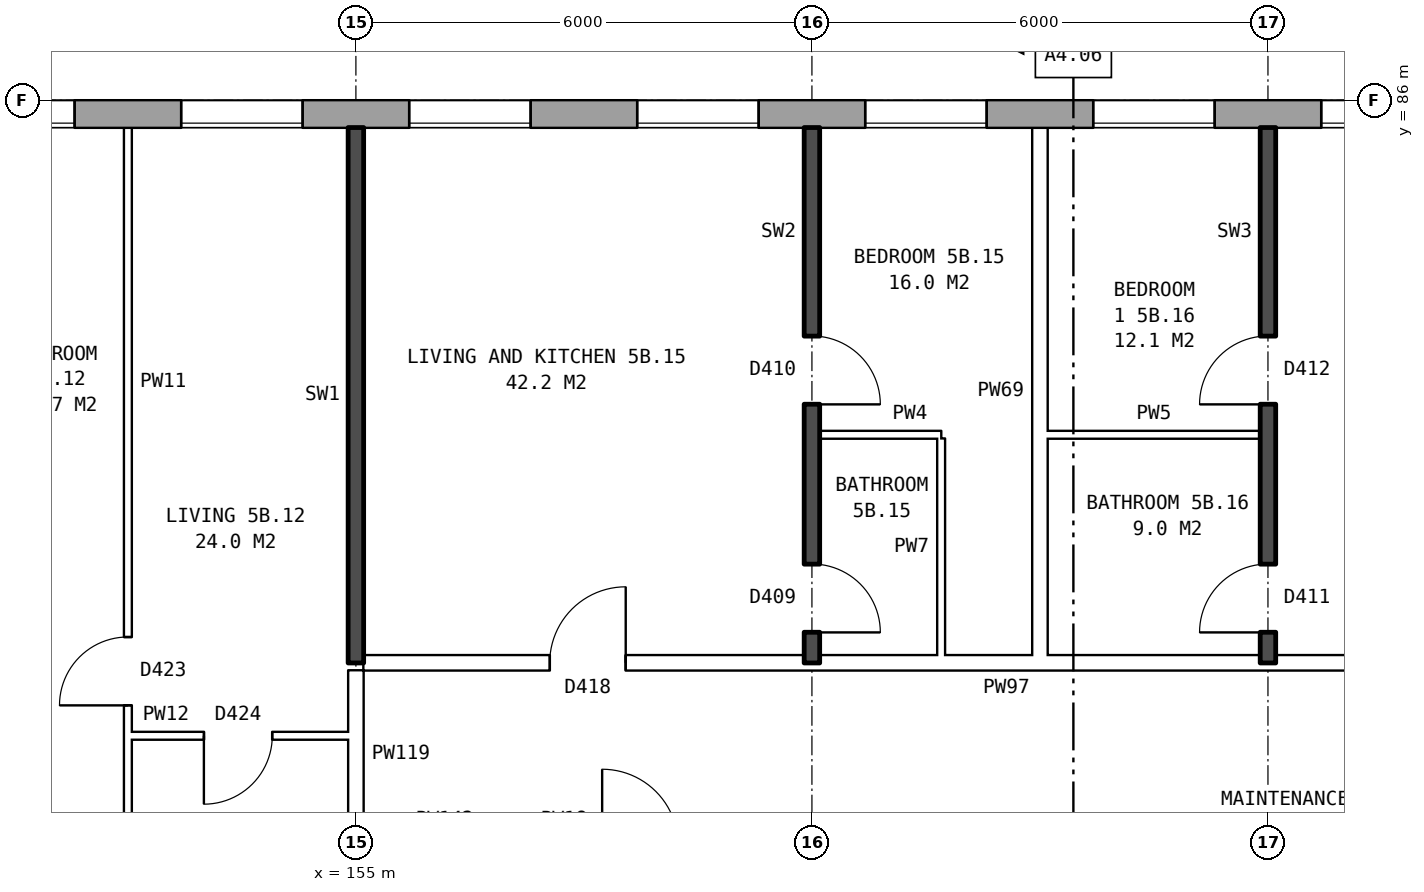
"""IFC4 building model, lengths in metres.
Left out: names, types, materials, properties, quantities, classifications, styles, units other than length and angle.
Written with IfcOpenShell. Run it as: python <this file> out.ifc"""

import sys

from ifc_helpers import new_model, si_unit, direction, frame, frame_2d, origin, place, context, subcontext, project, spatial, rectangle, extrude, element, fill, save


model = new_model("IFC4")
c1 = context("Model", 3, precision=1e-05, world=origin(), true_north=direction((0.0, 1.0)))
c2 = subcontext(c1, "Body", "Model", "MODEL_VIEW")
j1 = project(units=[si_unit("LENGTHUNIT", "METRE"), si_unit("PLANEANGLEUNIT", "RADIAN")], contexts=[c1])
p1 = place(None, origin())
s1 = spatial("IfcSite", under=j1, at=p1, CompositionType="ELEMENT")
p2 = place(p1, origin())
s2 = spatial("IfcBuilding", under=s1, at=p2, CompositionType="ELEMENT")
p3 = place(p2, frame((0.0, 0.0, 22.6)))
s3 = spatial("IfcBuildingStorey", under=s2, at=p3, CompositionType="ELEMENT", Elevation=22.6)
p4 = place(p3, frame((174.675, 85.82, 0.0), z_axis=(0.0, 0.0, 1.0), x_axis=(-1.0, 0.0, 0.0)))
e1 = element("IfcWall", 1, at=p4, inside=s3, PredefinedType="STANDARD", context=c2, shape_type="SweptSolid", body=[
    extrude(rectangle(XDim=40.601, YDim=0.36, at=frame_2d((20.3, 0.0))), origin(), (0.0, 0.0, 1.0), 2.85),
])
p5 = place(p4, frame((1.875, 0.0, 1.7)))
e2 = element("IfcOpeningElement", 2, at=p5, cuts=e1, PredefinedType="OPENING", context=c2, shape_type="SweptSolid", body=[
    extrude(rectangle(XDim=1.0, YDim=0.9, at=frame_2d((0.5, 0.45))), frame((0.0, 0.19, 0.0), z_axis=(0.0, -1.0, 0.0), x_axis=(1.0, 0.0, 0.0)), (0.0, 0.0, 1.0), 0.38),
])
p6 = place(p4, frame((5.375, 0.0, 0.8)))
e3 = element("IfcOpeningElement", 3, at=p6, cuts=e1, PredefinedType="OPENING", context=c2, shape_type="SweptSolid", body=[
    extrude(rectangle(XDim=1.6, YDim=1.8, at=frame_2d((0.8, 0.9))), frame((0.0, 0.19, 0.0), z_axis=(0.0, -1.0, 0.0), x_axis=(1.0, 0.0, 0.0)), (0.0, 0.0, 1.0), 0.38),
])
p7 = place(p4, frame((8.375, 0.0, 0.8)))
e4 = element("IfcOpeningElement", 4, at=p7, cuts=e1, PredefinedType="OPENING", context=c2, shape_type="SweptSolid", body=[
    extrude(rectangle(XDim=1.6, YDim=1.8, at=frame_2d((0.8, 0.9))), frame((0.0, 0.19, 0.0), z_axis=(0.0, -1.0, 0.0), x_axis=(1.0, 0.0, 0.0)), (0.0, 0.0, 1.0), 0.38),
])
p8 = place(p4, frame((11.375, 0.0, 0.8)))
e5 = element("IfcOpeningElement", 5, at=p8, cuts=e1, PredefinedType="OPENING", context=c2, shape_type="SweptSolid", body=[
    extrude(rectangle(XDim=1.6, YDim=1.8, at=frame_2d((0.8, 0.9))), frame((0.0, 0.19, 0.0), z_axis=(0.0, -1.0, 0.0), x_axis=(1.0, 0.0, 0.0)), (0.0, 0.0, 1.0), 0.38),
])
p9 = place(p4, frame((14.375, 0.0, 0.8)))
e6 = element("IfcOpeningElement", 6, at=p9, cuts=e1, PredefinedType="OPENING", context=c2, shape_type="SweptSolid", body=[
    extrude(rectangle(XDim=1.6, YDim=1.8, at=frame_2d((0.8, 0.9))), frame((0.0, 0.19, 0.0), z_axis=(0.0, -1.0, 0.0), x_axis=(1.0, 0.0, 0.0)), (0.0, 0.0, 1.0), 0.38),
])
p10 = place(p4, frame((17.375, 0.0, 0.8)))
e7 = element("IfcOpeningElement", 7, at=p10, cuts=e1, PredefinedType="OPENING", context=c2, shape_type="SweptSolid", body=[
    extrude(rectangle(XDim=1.6, YDim=1.8, at=frame_2d((0.8, 0.9))), frame((0.0, 0.19, 0.0), z_axis=(0.0, -1.0, 0.0), x_axis=(1.0, 0.0, 0.0)), (0.0, 0.0, 1.0), 0.38),
])
p11 = place(p4, frame((20.375, 0.0, 0.8)))
e8 = element("IfcOpeningElement", 8, at=p11, cuts=e1, PredefinedType="OPENING", context=c2, shape_type="SweptSolid", body=[
    extrude(rectangle(XDim=1.6, YDim=1.8, at=frame_2d((0.8, 0.9))), frame((0.0, 0.19, 0.0), z_axis=(0.0, -1.0, 0.0), x_axis=(1.0, 0.0, 0.0)), (0.0, 0.0, 1.0), 0.38),
])
p12 = place(p4, frame((23.375, 0.0, 0.8)))
e9 = element("IfcOpeningElement", 9, at=p12, cuts=e1, PredefinedType="OPENING", context=c2, shape_type="SweptSolid", body=[
    extrude(rectangle(XDim=1.6, YDim=1.8, at=frame_2d((0.8, 0.9))), frame((0.0, 0.19, 0.0), z_axis=(0.0, -1.0, 0.0), x_axis=(1.0, 0.0, 0.0)), (0.0, 0.0, 1.0), 0.38),
])
p13 = place(p4, frame((26.375, 0.0, 0.8)))
e10 = element("IfcOpeningElement", 10, at=p13, cuts=e1, PredefinedType="OPENING", context=c2, shape_type="SweptSolid", body=[
    extrude(rectangle(XDim=1.6, YDim=1.8, at=frame_2d((0.8, 0.9))), frame((0.0, 0.19, 0.0), z_axis=(0.0, -1.0, 0.0), x_axis=(1.0, 0.0, 0.0)), (0.0, 0.0, 1.0), 0.38),
])
p14 = place(p4, frame((29.375, 0.0, 0.8)))
e11 = element("IfcOpeningElement", 11, at=p14, cuts=e1, PredefinedType="OPENING", context=c2, shape_type="SweptSolid", body=[
    extrude(rectangle(XDim=1.6, YDim=1.8, at=frame_2d((0.8, 0.9))), frame((0.0, 0.19, 0.0), z_axis=(0.0, -1.0, 0.0), x_axis=(1.0, 0.0, 0.0)), (0.0, 0.0, 1.0), 0.38),
])
p15 = place(p4, frame((32.375, 0.0, 0.8)))
e12 = element("IfcOpeningElement", 12, at=p15, cuts=e1, PredefinedType="OPENING", context=c2, shape_type="SweptSolid", body=[
    extrude(rectangle(XDim=1.6, YDim=1.8, at=frame_2d((0.8, 0.9))), frame((0.0, 0.19, 0.0), z_axis=(0.0, -1.0, 0.0), x_axis=(1.0, 0.0, 0.0)), (0.0, 0.0, 1.0), 0.38),
])
p16 = place(p4, frame((34.275, 0.0, 0.8)))
e13 = element("IfcOpeningElement", 13, at=p16, cuts=e1, PredefinedType="OPENING", context=c2, shape_type="SweptSolid", body=[
    extrude(rectangle(XDim=1.0, YDim=1.8, at=frame_2d((0.5, 0.9))), frame((0.0, 0.19, 0.0), z_axis=(0.0, -1.0, 0.0), x_axis=(1.0, 0.0, 0.0)), (0.0, 0.0, 1.0), 0.38),
])
p17 = place(p4, frame((37.875, 0.0, 1.6)))
e14 = element("IfcOpeningElement", 14, at=p17, cuts=e1, PredefinedType="OPENING", context=c2, shape_type="SweptSolid", body=[
    extrude(rectangle(XDim=0.6, YDim=0.9, at=frame_2d((0.3, 0.45))), frame((0.0, 0.19, 0.0), z_axis=(0.0, -1.0, 0.0), x_axis=(1.0, 0.0, 0.0)), (0.0, 0.0, 1.0), 0.38),
])
p18 = place(p4, frame((4.125, 0.0, 0.8)))
e15 = element("IfcOpeningElement", 15, at=p18, cuts=e1, PredefinedType="OPENING", context=c2, shape_type="SweptSolid", body=[
    extrude(rectangle(XDim=0.8, YDim=0.9, at=frame_2d((0.4, 0.45))), frame((0.0, 0.19, 0.0), z_axis=(0.0, -1.0, 0.0), x_axis=(1.0, 0.0, 0.0)), (0.0, 0.0, 1.0), 0.38),
])
p19 = place(p4, frame((35.575, 0.0, 0.8)))
e16 = element("IfcOpeningElement", 16, at=p19, cuts=e1, PredefinedType="OPENING", context=c2, shape_type="SweptSolid", body=[
    extrude(rectangle(XDim=0.8, YDim=0.9, at=frame_2d((0.4, 0.45))), frame((0.0, 0.19, 0.0), z_axis=(0.0, -1.0, 0.0), x_axis=(1.0, 0.0, 0.0)), (0.0, 0.0, 1.0), 0.38),
])
p20 = place(p4, frame((38.875, 0.0, 0.8)))
e17 = element("IfcOpeningElement", 17, at=p20, cuts=e1, PredefinedType="OPENING", context=c2, shape_type="SweptSolid", body=[
    extrude(rectangle(XDim=1.4, YDim=1.8, at=frame_2d((0.7, 0.9))), frame((0.0, 0.19, 0.0), z_axis=(0.0, -1.0, 0.0), x_axis=(1.0, 0.0, 0.0)), (0.0, 0.0, 1.0), 0.38),
])
p21 = place(p3, frame((152.0, 77.64, 0.0), z_axis=(0.0, 0.0, 1.0), x_axis=(1.0, 0.0, 0.0)))
e18 = element("IfcWall", 18, at=p21, inside=s3, PredefinedType="PARTITIONING", context=c2, shape_type="SweptSolid", body=[
    extrude(rectangle(XDim=2.9, YDim=0.1, at=frame_2d((1.45, 0.0))), origin(), (0.0, 0.0, 1.0), 2.85),
])
p22 = place(p21, frame((1.0, 0.0, 0.0)))
e19 = element("IfcOpeningElement", 19, at=p22, cuts=e18, PredefinedType="OPENING", context=c2, shape_type="SweptSolid", body=[
    extrude(rectangle(XDim=0.9, YDim=2.1, at=frame_2d((0.45, 1.05))), frame((0.0, 0.06, 0.0), z_axis=(0.0, -1.0, 0.0), x_axis=(1.0, 0.0, 0.0)), (0.0, 0.0, 1.0), 0.12),
])
p23 = place(p3, frame((155.1, 78.6, 0.0), z_axis=(0.0, 0.0, 1.0), x_axis=(1.0, 0.0, 0.0)))
e20 = element("IfcWall", 20, at=p23, inside=s3, PredefinedType="PARTITIONING", context=c2, shape_type="SweptSolid", body=[
    extrude(rectangle(XDim=22.29, YDim=0.2, at=frame_2d((11.145, 0.0))), origin(), (0.0, 0.0, 1.0), 2.85),
])
p24 = place(p23, frame((2.45, 0.0, 0.0)))
e21 = element("IfcOpeningElement", 21, at=p24, cuts=e20, PredefinedType="OPENING", context=c2, shape_type="SweptSolid", body=[
    extrude(rectangle(XDim=1.0, YDim=2.1, at=frame_2d((0.5, 1.05))), frame((0.0, 0.11, 0.0), z_axis=(0.0, -1.0, 0.0), x_axis=(1.0, 0.0, 0.0)), (0.0, 0.0, 1.0), 0.22),
])
p25 = place(p23, frame((14.4, 0.0, 0.0)))
e22 = element("IfcOpeningElement", 22, at=p25, cuts=e20, PredefinedType="OPENING", context=c2, shape_type="SweptSolid", body=[
    extrude(rectangle(XDim=1.0, YDim=2.1, at=frame_2d((0.5, 1.05))), frame((0.0, 0.11, 0.0), z_axis=(0.0, -1.0, 0.0), x_axis=(1.0, 0.0, 0.0)), (0.0, 0.0, 1.0), 0.22),
])
p26 = place(p3, frame((161.1, 81.6, 0.0), z_axis=(0.0, 0.0, 1.0), x_axis=(1.0, 0.0, 0.0)))
e23 = element("IfcWall", 23, at=p26, inside=s3, PredefinedType="PARTITIONING", context=c2, shape_type="SweptSolid", body=[
    extrude(rectangle(XDim=1.6, YDim=0.1, at=frame_2d((0.8, 0.0))), origin(), (0.0, 0.0, 1.0), 2.85),
])
p27 = place(p3, frame((164.1, 81.6, 0.0), z_axis=(0.0, 0.0, 1.0), x_axis=(1.0, 0.0, 0.0)))
e24 = element("IfcWall", 24, at=p27, inside=s3, PredefinedType="PARTITIONING", context=c2, shape_type="SweptSolid", body=[
    extrude(rectangle(XDim=2.8, YDim=0.1, at=frame_2d((1.4, 0.0))), origin(), (0.0, 0.0, 1.0), 2.85),
])
p28 = place(p3, frame((152.0, 71.3, 0.0), z_axis=(0.0, 0.0, 1.0), x_axis=(0.0, 1.0, 0.0)))
e25 = element("IfcWall", 25, at=p28, inside=s3, PredefinedType="PARTITIONING", context=c2, shape_type="SweptSolid", body=[
    extrude(rectangle(XDim=14.34, YDim=0.1, at=frame_2d((7.17, 0.0))), origin(), (0.0, 0.0, 1.0), 2.85),
])
p29 = place(p28, frame((6.74, 0.0, 0.0)))
e26 = element("IfcOpeningElement", 26, at=p29, cuts=e25, PredefinedType="OPENING", context=c2, shape_type="SweptSolid", body=[
    extrude(rectangle(XDim=0.9, YDim=2.1, at=frame_2d((0.45, 1.05))), frame((0.0, 0.06, 0.0), z_axis=(0.0, -1.0, 0.0), x_axis=(1.0, 0.0, 0.0)), (0.0, 0.0, 1.0), 0.12),
])
p30 = place(p28, frame((0.4, 0.0, 0.0)))
e27 = element("IfcOpeningElement", 27, at=p30, cuts=e25, PredefinedType="OPENING", context=c2, shape_type="SweptSolid", body=[
    extrude(rectangle(XDim=0.9, YDim=2.1, at=frame_2d((0.45, 1.05))), frame((0.0, 0.06, 0.0), z_axis=(0.0, -1.0, 0.0), x_axis=(1.0, 0.0, 0.0)), (0.0, 0.0, 1.0), 0.12),
])
p31 = place(p3, frame((155.0, 76.3, 0.0), z_axis=(0.0, 0.0, 1.0), x_axis=(0.0, 1.0, 0.0)))
e28 = element("IfcWall", 28, at=p31, inside=s3, PredefinedType="PARTITIONING", context=c2, shape_type="SweptSolid", body=[
    extrude(rectangle(XDim=2.2, YDim=0.2, at=frame_2d((1.1, 0.0))), origin(), (0.0, 0.0, 1.0), 2.85),
])
p32 = place(p3, frame((155.0, 78.6, 0.0), z_axis=(0.0, 0.0, 1.0), x_axis=(0.0, 1.0, 0.0)))
e29 = element("IfcWall", 29, at=p32, inside=s3, PredefinedType="SOLIDWALL", context=c2, shape_type="SweptSolid", body=[
    extrude(rectangle(XDim=7.04, YDim=0.2, at=frame_2d((3.52, 0.0))), origin(), (0.0, 0.0, 1.0), 2.85),
])
p33 = place(p3, frame((161.0, 78.6, 0.0), z_axis=(0.0, 0.0, 1.0), x_axis=(0.0, 1.0, 0.0)))
e30 = element("IfcWall", 30, at=p33, inside=s3, PredefinedType="SOLIDWALL", context=c2, shape_type="SweptSolid", body=[
    extrude(rectangle(XDim=7.04, YDim=0.2, at=frame_2d((3.52, 0.0))), origin(), (0.0, 0.0, 1.0), 2.85),
])
p34 = place(p33, frame((3.4, 0.0, 0.0)))
e31 = element("IfcOpeningElement", 31, at=p34, cuts=e30, PredefinedType="OPENING", context=c2, shape_type="SweptSolid", body=[
    extrude(rectangle(XDim=0.9, YDim=2.1, at=frame_2d((0.45, 1.05))), frame((0.0, 0.11, 0.0), z_axis=(0.0, -1.0, 0.0), x_axis=(1.0, 0.0, 0.0)), (0.0, 0.0, 1.0), 0.22),
])
p35 = place(p33, frame((0.4, 0.0, 0.0)))
e32 = element("IfcOpeningElement", 32, at=p35, cuts=e30, PredefinedType="OPENING", context=c2, shape_type="SweptSolid", body=[
    extrude(rectangle(XDim=0.9, YDim=2.1, at=frame_2d((0.45, 1.05))), frame((0.0, 0.11, 0.0), z_axis=(0.0, -1.0, 0.0), x_axis=(1.0, 0.0, 0.0)), (0.0, 0.0, 1.0), 0.22),
])
p36 = place(p3, frame((162.7, 78.7, 0.0), z_axis=(0.0, 0.0, 1.0), x_axis=(0.0, 1.0, 0.0)))
e33 = element("IfcWall", 33, at=p36, inside=s3, PredefinedType="PARTITIONING", context=c2, shape_type="SweptSolid", body=[
    extrude(rectangle(XDim=2.85, YDim=0.1, at=frame_2d((1.425, 0.0))), origin(), (0.0, 0.0, 1.0), 2.85),
])
p37 = place(p3, frame((164.0, 78.7, 0.0), z_axis=(0.0, 0.0, 1.0), x_axis=(0.0, 1.0, 0.0)))
e34 = element("IfcWall", 34, at=p37, inside=s3, PredefinedType="PARTITIONING", context=c2, shape_type="SweptSolid", body=[
    extrude(rectangle(XDim=6.94, YDim=0.2, at=frame_2d((3.47, 0.0))), origin(), (0.0, 0.0, 1.0), 2.85),
])
p38 = place(p3, frame((167.0, 78.6, 0.0), z_axis=(0.0, 0.0, 1.0), x_axis=(0.0, 1.0, 0.0)))
e35 = element("IfcWall", 35, at=p38, inside=s3, PredefinedType="SOLIDWALL", context=c2, shape_type="SweptSolid", body=[
    extrude(rectangle(XDim=7.04, YDim=0.2, at=frame_2d((3.52, 0.0))), origin(), (0.0, 0.0, 1.0), 2.85),
])
p39 = place(p38, frame((3.4, 0.0, 0.0)))
e36 = element("IfcOpeningElement", 36, at=p39, cuts=e35, PredefinedType="OPENING", context=c2, shape_type="SweptSolid", body=[
    extrude(rectangle(XDim=0.9, YDim=2.1, at=frame_2d((0.45, 1.05))), frame((0.0, 0.11, 0.0), z_axis=(0.0, -1.0, 0.0), x_axis=(1.0, 0.0, 0.0)), (0.0, 0.0, 1.0), 0.22),
])
p40 = place(p38, frame((0.4, 0.0, 0.0)))
e37 = element("IfcOpeningElement", 37, at=p40, cuts=e35, PredefinedType="OPENING", context=c2, shape_type="SweptSolid", body=[
    extrude(rectangle(XDim=0.9, YDim=2.1, at=frame_2d((0.45, 1.05))), frame((0.0, 0.11, 0.0), z_axis=(0.0, -1.0, 0.0), x_axis=(1.0, 0.0, 0.0)), (0.0, 0.0, 1.0), 0.22),
])
p41 = place(p6, origin())
e38 = element("IfcWindow", 38, at=p41, inside=s3, PartitioningType="SINGLE_PANEL", PredefinedType="WINDOW", context=c2, shape_type="SweptSolid", body=[
    extrude(rectangle(XDim=1.6, YDim=1.8, at=frame_2d((0.8, 0.9))), frame((0.0, 0.15, 0.0), z_axis=(0.0, -1.0, 0.0), x_axis=(1.0, 0.0, 0.0)), (0.0, 0.0, 1.0), 0.06),
])
fill(e3, e38)
p42 = place(p7, origin())
e39 = element("IfcWindow", 39, at=p42, inside=s3, PartitioningType="SINGLE_PANEL", PredefinedType="WINDOW", context=c2, shape_type="SweptSolid", body=[
    extrude(rectangle(XDim=1.6, YDim=1.8, at=frame_2d((0.8, 0.9))), frame((0.0, 0.15, 0.0), z_axis=(0.0, -1.0, 0.0), x_axis=(1.0, 0.0, 0.0)), (0.0, 0.0, 1.0), 0.06),
])
fill(e4, e39)
p43 = place(p8, origin())
e40 = element("IfcWindow", 40, at=p43, inside=s3, PartitioningType="SINGLE_PANEL", PredefinedType="WINDOW", context=c2, shape_type="SweptSolid", body=[
    extrude(rectangle(XDim=1.6, YDim=1.8, at=frame_2d((0.8, 0.9))), frame((0.0, 0.15, 0.0), z_axis=(0.0, -1.0, 0.0), x_axis=(1.0, 0.0, 0.0)), (0.0, 0.0, 1.0), 0.06),
])
fill(e5, e40)
p44 = place(p9, origin())
e41 = element("IfcWindow", 41, at=p44, inside=s3, PartitioningType="SINGLE_PANEL", PredefinedType="WINDOW", context=c2, shape_type="SweptSolid", body=[
    extrude(rectangle(XDim=1.6, YDim=1.8, at=frame_2d((0.8, 0.9))), frame((0.0, 0.15, 0.0), z_axis=(0.0, -1.0, 0.0), x_axis=(1.0, 0.0, 0.0)), (0.0, 0.0, 1.0), 0.06),
])
fill(e6, e41)
p45 = place(p10, origin())
e42 = element("IfcWindow", 42, at=p45, inside=s3, PartitioningType="SINGLE_PANEL", PredefinedType="WINDOW", context=c2, shape_type="SweptSolid", body=[
    extrude(rectangle(XDim=1.6, YDim=1.8, at=frame_2d((0.8, 0.9))), frame((0.0, 0.15, 0.0), z_axis=(0.0, -1.0, 0.0), x_axis=(1.0, 0.0, 0.0)), (0.0, 0.0, 1.0), 0.06),
])
fill(e7, e42)
p46 = place(p11, origin())
e43 = element("IfcWindow", 43, at=p46, inside=s3, PartitioningType="SINGLE_PANEL", PredefinedType="WINDOW", context=c2, shape_type="SweptSolid", body=[
    extrude(rectangle(XDim=1.6, YDim=1.8, at=frame_2d((0.8, 0.9))), frame((0.0, 0.15, 0.0), z_axis=(0.0, -1.0, 0.0), x_axis=(1.0, 0.0, 0.0)), (0.0, 0.0, 1.0), 0.06),
])
fill(e8, e43)
p47 = place(p12, origin())
e44 = element("IfcWindow", 44, at=p47, inside=s3, PartitioningType="SINGLE_PANEL", PredefinedType="WINDOW", context=c2, shape_type="SweptSolid", body=[
    extrude(rectangle(XDim=1.6, YDim=1.8, at=frame_2d((0.8, 0.9))), frame((0.0, 0.15, 0.0), z_axis=(0.0, -1.0, 0.0), x_axis=(1.0, 0.0, 0.0)), (0.0, 0.0, 1.0), 0.06),
])
fill(e9, e44)
p48 = place(p29, origin())
e45 = element("IfcDoor", 45, at=p48, inside=s3, OperationType="SINGLE_SWING_LEFT", PredefinedType="DOOR", context=c2, shape_type="SweptSolid", body=[
    extrude(rectangle(XDim=0.9, YDim=2.1, at=frame_2d((0.45, 1.05))), frame((0.0, 0.025, 0.0), z_axis=(0.0, -1.0, 0.0), x_axis=(1.0, 0.0, 0.0)), (0.0, 0.0, 1.0), 0.05),
])
fill(e26, e45)
p49 = place(p22, frame((0.9, 0.0, 0.0), z_axis=(0.0, 0.0, 1.0), x_axis=(-1.0, 0.0, 0.0)))
e46 = element("IfcDoor", 46, at=p49, inside=s3, OperationType="SINGLE_SWING_RIGHT", PredefinedType="DOOR", context=c2, shape_type="SweptSolid", body=[
    extrude(rectangle(XDim=0.9, YDim=2.1, at=frame_2d((0.45, 1.05))), frame((0.0, 0.025, 0.0), z_axis=(0.0, -1.0, 0.0), x_axis=(1.0, 0.0, 0.0)), (0.0, 0.0, 1.0), 0.05),
])
fill(e19, e46)
p50 = place(p34, frame((0.9, 0.0, 0.0), z_axis=(0.0, 0.0, 1.0), x_axis=(-1.0, 0.0, 0.0)))
e47 = element("IfcDoor", 47, at=p50, inside=s3, OperationType="SINGLE_SWING_RIGHT", PredefinedType="DOOR", context=c2, shape_type="SweptSolid", body=[
    extrude(rectangle(XDim=0.9, YDim=2.1, at=frame_2d((0.45, 1.05))), frame((0.0, 0.025, 0.0), z_axis=(0.0, -1.0, 0.0), x_axis=(1.0, 0.0, 0.0)), (0.0, 0.0, 1.0), 0.05),
])
fill(e31, e47)
p51 = place(p24, origin())
e48 = element("IfcDoor", 48, at=p51, inside=s3, OperationType="SINGLE_SWING_RIGHT", PredefinedType="DOOR", context=c2, shape_type="SweptSolid", body=[
    extrude(rectangle(XDim=1.0, YDim=2.1, at=frame_2d((0.5, 1.05))), frame((0.0, 0.025, 0.0), z_axis=(0.0, -1.0, 0.0), x_axis=(1.0, 0.0, 0.0)), (0.0, 0.0, 1.0), 0.05),
])
fill(e21, e48)
p52 = place(p35, frame((0.9, 0.0, 0.0), z_axis=(0.0, 0.0, 1.0), x_axis=(-1.0, 0.0, 0.0)))
e49 = element("IfcDoor", 49, at=p52, inside=s3, OperationType="SINGLE_SWING_RIGHT", PredefinedType="DOOR", context=c2, shape_type="SweptSolid", body=[
    extrude(rectangle(XDim=0.9, YDim=2.1, at=frame_2d((0.45, 1.05))), frame((0.0, 0.025, 0.0), z_axis=(0.0, -1.0, 0.0), x_axis=(1.0, 0.0, 0.0)), (0.0, 0.0, 1.0), 0.05),
])
fill(e32, e49)
p53 = place(p39, origin())
e50 = element("IfcDoor", 50, at=p53, inside=s3, OperationType="SINGLE_SWING_LEFT", PredefinedType="DOOR", context=c2, shape_type="SweptSolid", body=[
    extrude(rectangle(XDim=0.9, YDim=2.1, at=frame_2d((0.45, 1.05))), frame((0.0, 0.025, 0.0), z_axis=(0.0, -1.0, 0.0), x_axis=(1.0, 0.0, 0.0)), (0.0, 0.0, 1.0), 0.05),
])
fill(e36, e50)
p54 = place(p40, origin())
e51 = element("IfcDoor", 51, at=p54, inside=s3, OperationType="SINGLE_SWING_LEFT", PredefinedType="DOOR", context=c2, shape_type="SweptSolid", body=[
    extrude(rectangle(XDim=0.9, YDim=2.1, at=frame_2d((0.45, 1.05))), frame((0.0, 0.025, 0.0), z_axis=(0.0, -1.0, 0.0), x_axis=(1.0, 0.0, 0.0)), (0.0, 0.0, 1.0), 0.05),
])
fill(e37, e51)
save(model, sys.argv[1])
